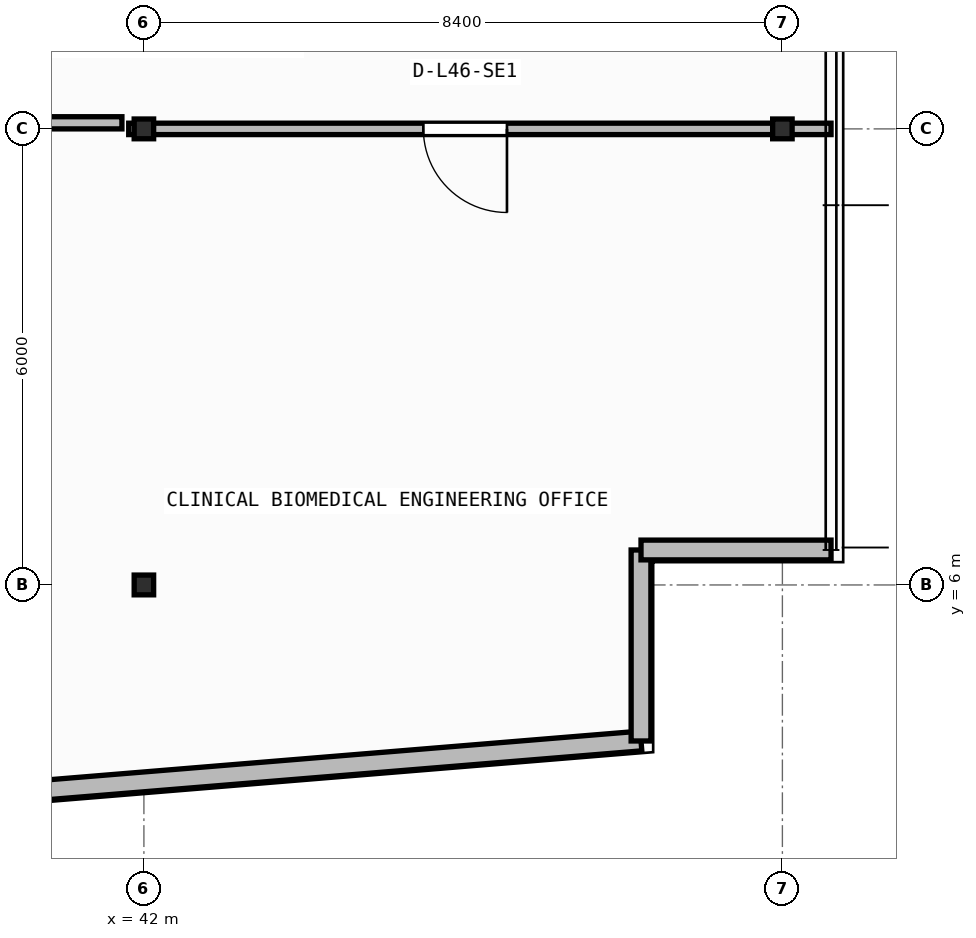
"""IFC4 building model, lengths in metres.
Left out: names, types, materials, properties, quantities, classifications, styles, units other than length and angle.
Written with IfcOpenShell. Run it as: python <this file> out.ifc"""

import sys

from ifc_helpers import new_model, si_unit, direction, frame, frame_2d, origin, origin_2d, place, context, subcontext, project, spatial, rectangle, i_section, extrude, element, fill, save


model = new_model("IFC4")
c1 = context("Model", 3, precision=1e-05, world=origin(), true_north=direction((0.0, 1.0)))
c2 = subcontext(c1, "Body", "Model", "MODEL_VIEW")
j1 = project(units=[si_unit("LENGTHUNIT", "METRE"), si_unit("PLANEANGLEUNIT", "RADIAN")], contexts=[c1])
p1 = place(None, origin())
s1 = spatial("IfcSite", under=j1, at=p1, CompositionType="ELEMENT")
p2 = place(p1, origin())
s2 = spatial("IfcBuilding", under=s1, at=p2, CompositionType="ELEMENT")
p3 = place(p2, frame((0.0, 0.0, 188.15)))
s3 = spatial("IfcBuildingStorey", under=s2, at=p3, CompositionType="ELEMENT", Elevation=188.15)
for number, where, z_axis, x_axis in (
    (1, (42.0, 6.0, 0.0), (0.0, 0.0, 1.0), (1.0, 0.0, 0.0)),
    (2, (42.0, 12.0, 0.0), (0.0, 0.0, 1.0), (1.0, 0.0, 0.0)),
    (3, (50.4, 12.0, 0.0), (0.0, 0.0, 1.0), (1.0, 0.0, 0.0)),
):
    element("IfcColumn", number, at=place(p3, frame(where, z_axis=z_axis, x_axis=x_axis)), inside=s3, PredefinedType="COLUMN", context=c2, shape_type="SweptSolid", body=[
        extrude(i_section(OverallWidth=0.256, OverallDepth=0.26, WebThickness=0.01, FlangeThickness=0.017, FilletRadius=0.013, at=origin_2d()), origin(), (0.0, 0.0, 1.0), 3.95),
    ])
p4 = place(p3, frame((2.66, 0.174, 0.0), z_axis=(0.0, 0.0, 1.0), x_axis=(0.996634028439, 0.081979347142, 0.0)))
e4 = element("IfcWall", 4, at=p4, inside=s3, PredefinedType="STANDARD", context=c2, shape_type="SweptSolid", body=[
    extrude(rectangle(XDim=46.035, YDim=0.26, at=frame_2d((23.018, 0.0))), origin(), (0.0, 0.0, 1.0), 3.71),
])
p5 = place(p4, frame((21.817, 0.0, 0.9)))
e5 = element("IfcOpeningElement", 5, at=p5, cuts=e4, PredefinedType="OPENING", context=c2, shape_type="SweptSolid", body=[
    extrude(rectangle(XDim=2.4, YDim=1.65, at=frame_2d((1.2, 0.825))), frame((0.0, 0.14, 0.0), z_axis=(0.0, -1.0, 0.0), x_axis=(1.0, 0.0, 0.0)), (0.0, 0.0, 1.0), 0.28),
])
p6 = place(p3, frame((48.54, 3.948, 0.0), z_axis=(0.0, 0.0, 1.0), x_axis=(0.0, 1.0, 0.0)))
e6 = element("IfcWall", 6, at=p6, inside=s3, PredefinedType="STANDARD", context=c2, shape_type="SweptSolid", body=[
    extrude(rectangle(XDim=2.512, YDim=0.26, at=frame_2d((1.256, 0.0))), origin(), (0.0, 0.0, 1.0), 3.71),
])
p7 = place(p3, frame((48.54, 6.46, 0.0), z_axis=(0.0, 0.0, 1.0), x_axis=(1.0, 0.0, 0.0)))
e7 = element("IfcWall", 7, at=p7, inside=s3, PredefinedType="STANDARD", context=c2, shape_type="SweptSolid", body=[
    extrude(rectangle(XDim=2.5, YDim=0.26, at=frame_2d((1.25, 0.0))), origin(), (0.0, 0.0, 1.0), 3.71),
])
p8 = place(p3, frame((51.04, 12.0, 0.0), z_axis=(0.0, 0.0, 1.0), x_axis=(-1.0, 0.0, 0.0)))
e8 = element("IfcWall", 8, at=p8, inside=s3, PredefinedType="PARTITIONING", context=c2, shape_type="SweptSolid", body=[
    extrude(rectangle(XDim=9.24, YDim=0.15, at=frame_2d((4.62, 0.0))), origin(), (0.0, 0.0, 1.0), 3.152),
])
p9 = place(p8, frame((4.263, 0.0, 0.0)))
e9 = element("IfcOpeningElement", 9, at=p9, cuts=e8, PredefinedType="OPENING", context=c2, shape_type="SweptSolid", body=[
    extrude(rectangle(XDim=1.1, YDim=2.1, at=frame_2d((0.55, 1.05))), frame((0.0, 0.085, 0.0), z_axis=(0.0, -1.0, 0.0), x_axis=(1.0, 0.0, 0.0)), (0.0, 0.0, 1.0), 0.17),
])
p10 = place(p3, frame((39.839, 12.08, 0.0), z_axis=(0.0, 0.0, 1.0), x_axis=(1.0, 0.0, 0.0)))
e10 = element("IfcWall", 10, at=p10, inside=s3, PredefinedType="PARTITIONING", context=c2, shape_type="SweptSolid", body=[
    extrude(rectangle(XDim=1.871, YDim=0.16, at=frame_2d((0.936, 0.0))), origin(), (0.0, 0.0, 1.0), 3.152),
])
p11 = place(p9, origin())
e11 = element("IfcDoor", 11, at=p11, inside=s3, OperationType="SINGLE_SWING_LEFT", PredefinedType="DOOR", context=c2, shape_type="SweptSolid", body=[
    extrude(rectangle(XDim=1.1, YDim=2.1, at=frame_2d((0.55, 1.05))), frame((0.0, 0.025, 0.0), z_axis=(0.0, -1.0, 0.0), x_axis=(1.0, 0.0, 0.0)), (0.0, 0.0, 1.0), 0.05),
])
fill(e9, e11)
save(model, sys.argv[1])
